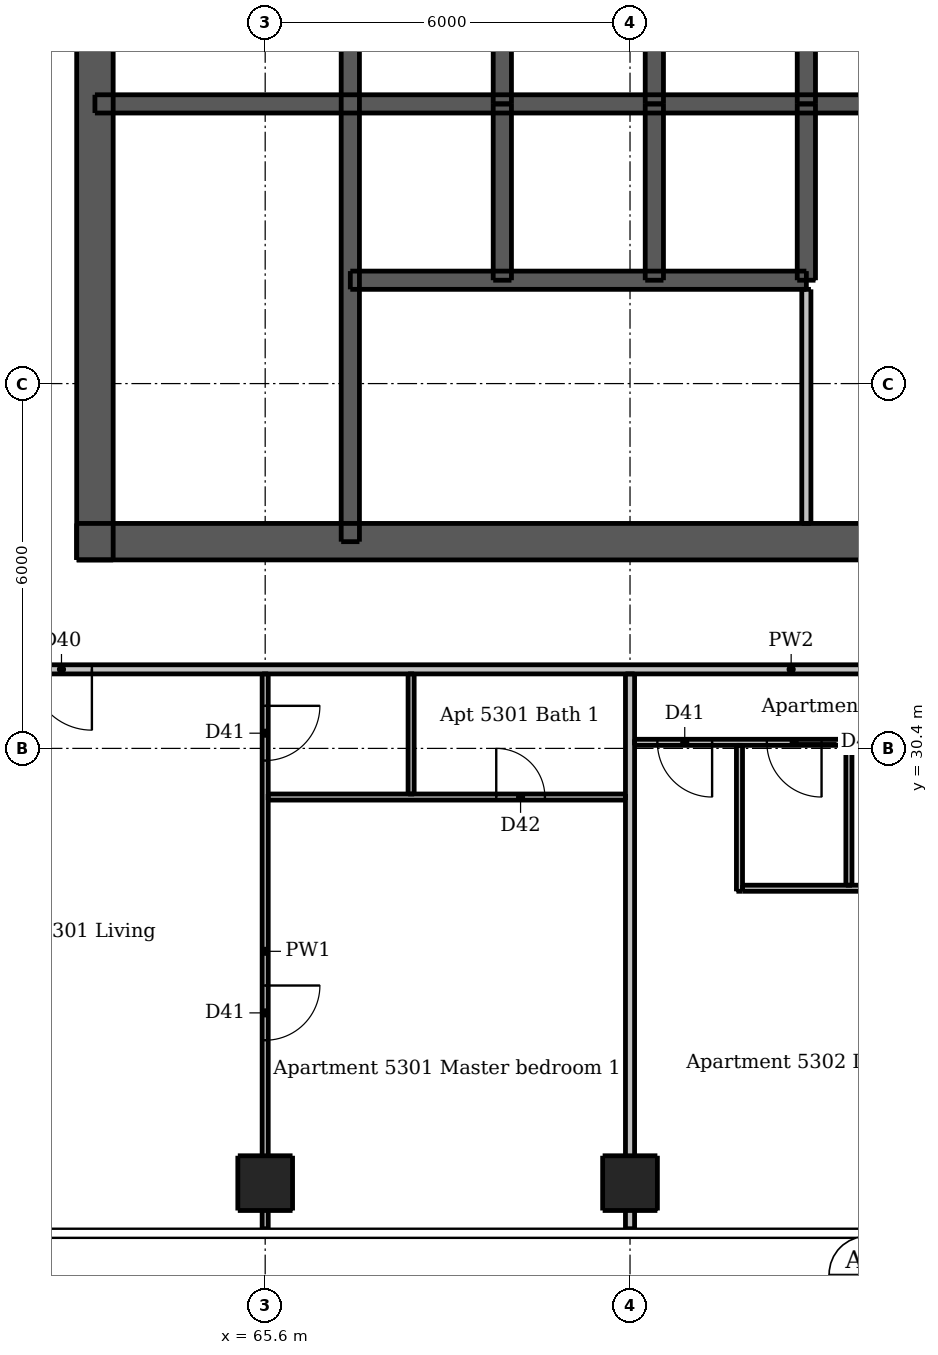
"""IFC4 building model, lengths in metres.
Left out: names, types, materials, properties, quantities, classifications, styles, units other than length and angle.
Written with IfcOpenShell. Run it as: python <this file> out.ifc"""

import sys

from ifc_helpers import new_model, si_unit, direction, frame, frame_2d, origin, origin_2d, place, context, subcontext, project, spatial, rectangle, extrude, element, fill, save


model = new_model("IFC4")
c1 = context("Model", 3, precision=1e-05, world=origin(), true_north=direction((0.0, 1.0)))
c2 = subcontext(c1, "Body", "Model", "MODEL_VIEW")
j1 = project(units=[si_unit("LENGTHUNIT", "METRE"), si_unit("PLANEANGLEUNIT", "RADIAN")], contexts=[c1])
p1 = place(None, origin())
s1 = spatial("IfcSite", under=j1, at=p1, CompositionType="ELEMENT")
p2 = place(p1, origin())
s2 = spatial("IfcBuilding", under=s1, at=p2, CompositionType="ELEMENT")
p3 = place(p2, frame((0.0, 0.0, 200.2)))
s3 = spatial("IfcBuildingStorey", under=s2, at=p3, CompositionType="ELEMENT", Elevation=200.2)
p4 = place(p3, frame((62.5, 33.8, 0.0), z_axis=(0.0, 0.0, 1.0), x_axis=(1.0, 0.0, 0.0)))
e1 = element("IfcWall", 1, at=p4, inside=s3, PredefinedType="SHEAR", context=c2, shape_type="SweptSolid", body=[
    extrude(rectangle(XDim=24.0, YDim=0.6, at=frame_2d((12.0, 0.0))), origin(), (0.0, 0.0, 1.0), 3.05),
])
p5 = place(p4, frame((1.925, 0.0, 0.0)))
e2 = element("IfcOpeningElement", 2, at=p5, cuts=e1, PredefinedType="OPENING", context=c2, shape_type="SweptSolid", body=[
    extrude(rectangle(XDim=1.1, YDim=2.1, at=frame_2d((0.55, 1.05))), frame((0.0, 0.31, 0.0), z_axis=(0.0, -1.0, 0.0), x_axis=(1.0, 0.0, 0.0)), (0.0, 0.0, 1.0), 0.62),
])
p6 = place(p4, frame((20.975, 0.0, 0.0)))
e3 = element("IfcOpeningElement", 3, at=p6, cuts=e1, PredefinedType="OPENING", context=c2, shape_type="SweptSolid", body=[
    extrude(rectangle(XDim=1.1, YDim=2.1, at=frame_2d((0.55, 1.05))), frame((0.0, 0.31, 0.0), z_axis=(0.0, -1.0, 0.0), x_axis=(1.0, 0.0, 0.0)), (0.0, 0.0, 1.0), 0.62),
])
p7 = place(p4, frame((8.0, 0.0, 0.0)))
e4 = element("IfcOpeningElement", 4, at=p7, cuts=e1, PredefinedType="OPENING", context=c2, shape_type="SweptSolid", body=[
    extrude(rectangle(XDim=1.1, YDim=2.1, at=frame_2d((0.55, 1.05))), frame((0.0, 0.31, 0.0), z_axis=(0.0, -1.0, 0.0), x_axis=(1.0, 0.0, 0.0)), (0.0, 0.0, 1.0), 0.62),
])
p8 = place(p4, frame((15.3, 0.0, 0.0)))
e5 = element("IfcOpeningElement", 5, at=p8, cuts=e1, PredefinedType="OPENING", context=c2, shape_type="SweptSolid", body=[
    extrude(rectangle(XDim=0.9, YDim=2.1, at=frame_2d((0.45, 1.05))), frame((0.0, 0.31, 0.0), z_axis=(0.0, -1.0, 0.0), x_axis=(1.0, 0.0, 0.0)), (0.0, 0.0, 1.0), 0.62),
])
p9 = place(p3, frame((62.8, 33.5, 0.0), z_axis=(0.0, 0.0, 1.0), x_axis=(0.0, 1.0, 0.0)))
e6 = element("IfcWall", 6, at=p9, inside=s3, PredefinedType="SHEAR", context=c2, shape_type="SweptSolid", body=[
    extrude(rectangle(XDim=24.0, YDim=0.6, at=frame_2d((12.0, 0.0))), origin(), (0.0, 0.0, 1.0), 3.05),
])
p10 = place(p9, frame((11.2, 0.0, 0.0)))
e7 = element("IfcOpeningElement", 7, at=p10, cuts=e6, PredefinedType="OPENING", context=c2, shape_type="SweptSolid", body=[
    extrude(rectangle(XDim=1.6, YDim=2.1, at=frame_2d((0.8, 1.05))), frame((0.0, 0.31, 0.0), z_axis=(0.0, -1.0, 0.0), x_axis=(1.0, 0.0, 0.0)), (0.0, 0.0, 1.0), 0.62),
])
p11 = place(p3, frame((62.8, 41.0, 0.0), z_axis=(0.0, 0.0, 1.0), x_axis=(1.0, 0.0, 0.0)))
e8 = element("IfcWall", 8, at=p11, inside=s3, PredefinedType="SHEAR", context=c2, shape_type="SweptSolid", body=[
    extrude(rectangle(XDim=23.4, YDim=0.3, at=frame_2d((11.7, 0.0))), origin(), (0.0, 0.0, 1.0), 3.05),
])
p12 = place(p3, frame((67.0, 33.8, 0.0), z_axis=(0.0, 0.0, 1.0), x_axis=(0.0, 1.0, 0.0)))
e9 = element("IfcWall", 9, at=p12, inside=s3, PredefinedType="SHEAR", context=c2, shape_type="SweptSolid", body=[
    extrude(rectangle(XDim=10.1, YDim=0.3, at=frame_2d((5.05, 0.0))), origin(), (0.0, 0.0, 1.0), 3.05),
])
p13 = place(p12, frame((0.5, 0.0, 0.0)))
e10 = element("IfcOpeningElement", 10, at=p13, cuts=e9, PredefinedType="OPENING", context=c2, shape_type="SweptSolid", body=[
    extrude(rectangle(XDim=1.1, YDim=2.1, at=frame_2d((0.55, 1.05))), frame((0.0, 0.16, 0.0), z_axis=(0.0, -1.0, 0.0), x_axis=(1.0, 0.0, 0.0)), (0.0, 0.0, 1.0), 0.32),
])
for number, where, z_axis, x_axis in (
    (11, (69.5, 41.0, 0.0), (0.0, 0.0, 1.0), (0.0, 1.0, 0.0)),
    (12, (72.0, 41.0, 0.0), (0.0, 0.0, 1.0), (0.0, 1.0, 0.0)),
    (13, (74.5, 41.0, 0.0), (0.0, 0.0, 1.0), (0.0, 1.0, 0.0)),
):
    element("IfcWall", number, at=place(p3, frame(where, z_axis=z_axis, x_axis=x_axis)), inside=s3, PredefinedType="SHEAR", context=c2, shape_type="SweptSolid", body=[
        extrude(rectangle(XDim=2.9, YDim=0.3, at=frame_2d((1.45, 0.0))), origin(), (0.0, 0.0, 1.0), 3.05),
    ])
p14 = place(p3, frame((67.0, 38.1, 0.0), z_axis=(0.0, 0.0, 1.0), x_axis=(1.0, 0.0, 0.0)))
e14 = element("IfcWall", 14, at=p14, inside=s3, PredefinedType="SHEAR", context=c2, shape_type="SweptSolid", body=[
    extrude(rectangle(XDim=7.5, YDim=0.3, at=frame_2d((3.75, 0.0))), origin(), (0.0, 0.0, 1.0), 3.05),
])
p15 = place(p14, frame((0.7, 0.0, 0.0)))
e15 = element("IfcOpeningElement", 15, at=p15, cuts=e14, PredefinedType="OPENING", context=c2, shape_type="SweptSolid", body=[
    extrude(rectangle(XDim=1.1, YDim=2.1, at=frame_2d((0.55, 1.05))), frame((0.0, 0.16, 0.0), z_axis=(0.0, -1.0, 0.0), x_axis=(1.0, 0.0, 0.0)), (0.0, 0.0, 1.0), 0.32),
])
p16 = place(p14, frame((3.2, 0.0, 0.0)))
e16 = element("IfcOpeningElement", 16, at=p16, cuts=e14, PredefinedType="OPENING", context=c2, shape_type="SweptSolid", body=[
    extrude(rectangle(XDim=1.1, YDim=2.1, at=frame_2d((0.55, 1.05))), frame((0.0, 0.16, 0.0), z_axis=(0.0, -1.0, 0.0), x_axis=(1.0, 0.0, 0.0)), (0.0, 0.0, 1.0), 0.32),
])
p17 = place(p14, frame((5.65, 0.0, 0.0)))
e17 = element("IfcOpeningElement", 17, at=p17, cuts=e14, PredefinedType="OPENING", context=c2, shape_type="SweptSolid", body=[
    extrude(rectangle(XDim=1.2, YDim=2.1, at=frame_2d((0.6, 1.05))), frame((0.0, 0.16, 0.0), z_axis=(0.0, -1.0, 0.0), x_axis=(1.0, 0.0, 0.0)), (0.0, 0.0, 1.0), 0.32),
])
for number, where, z_axis, x_axis in (
    (18, (69.5, 38.1, 0.0), (0.0, 0.0, 1.0), (0.0, 1.0, 0.0)),
    (19, (72.0, 38.1, 0.0), (0.0, 0.0, 1.0), (0.0, 1.0, 0.0)),
    (20, (74.5, 38.1, 0.0), (0.0, 0.0, 1.0), (0.0, 1.0, 0.0)),
):
    element("IfcWall", number, at=place(p3, frame(where, z_axis=z_axis, x_axis=x_axis)), inside=s3, PredefinedType="SHEAR", context=c2, shape_type="SweptSolid", body=[
        extrude(rectangle(XDim=2.9, YDim=0.3, at=frame_2d((1.45, 0.0))), origin(), (0.0, 0.0, 1.0), 3.05),
    ])
for number, where, z_axis, x_axis in (
    (21, (65.6, 23.25, 0.0), (0.0, 0.0, 1.0), (1.0, 0.0, 0.0)),
    (22, (71.6, 23.25, 0.0), (0.0, 0.0, 1.0), (1.0, 0.0, 0.0)),
):
    element("IfcColumn", number, at=place(p3, frame(where, z_axis=z_axis, x_axis=x_axis)), inside=s3, PredefinedType="COLUMN", context=c2, shape_type="SweptSolid", body=[
        extrude(rectangle(XDim=0.9, YDim=0.9, at=origin_2d()), origin(), (0.0, 0.0, 1.0), 3.05),
    ])
p18 = place(p3, frame((74.5, 34.1, 0.0), z_axis=(0.0, 0.0, 1.0), x_axis=(0.0, 1.0, 0.0)))
e23 = element("IfcWall", 23, at=p18, inside=s3, PredefinedType="PLUMBINGWALL", context=c2, shape_type="SweptSolid", body=[
    extrude(rectangle(XDim=3.85, YDim=0.15, at=frame_2d((1.925, 0.0))), origin(), (0.0, 0.0, 1.0), 3.05),
])
p19 = place(p3, frame((65.6, 31.625, 0.0), z_axis=(0.0, 0.0, 1.0), x_axis=(0.0, -1.0, 0.0)))
e24 = element("IfcWall", 24, at=p19, inside=s3, PredefinedType="PARTITIONING", context=c2, shape_type="SweptSolid", body=[
    extrude(rectangle(XDim=9.125, YDim=0.1, at=frame_2d((4.562, 0.0))), origin(), (0.0, 0.0, 1.0), 2.516),
])
p20 = place(p19, frame((0.525, 0.0, 0.0)))
e25 = element("IfcOpeningElement", 25, at=p20, cuts=e24, PredefinedType="OPENING", context=c2, shape_type="SweptSolid", body=[
    extrude(rectangle(XDim=0.9, YDim=2.1, at=frame_2d((0.45, 1.05))), frame((0.0, 0.06, 0.0), z_axis=(0.0, -1.0, 0.0), x_axis=(1.0, 0.0, 0.0)), (0.0, 0.0, 1.0), 0.12),
])
p21 = place(p19, frame((5.125, 0.0, 0.0)))
e26 = element("IfcOpeningElement", 26, at=p21, cuts=e24, PredefinedType="OPENING", context=c2, shape_type="SweptSolid", body=[
    extrude(rectangle(XDim=0.9, YDim=2.1, at=frame_2d((0.45, 1.05))), frame((0.0, 0.06, 0.0), z_axis=(0.0, -1.0, 0.0), x_axis=(1.0, 0.0, 0.0)), (0.0, 0.0, 1.0), 0.12),
])
p22 = place(p3, frame((68.0, 29.65, 0.0), z_axis=(0.0, 0.0, 1.0), x_axis=(0.0, 1.0, 0.0)))
e27 = element("IfcWall", 27, at=p22, inside=s3, PredefinedType="PARTITIONING", context=c2, shape_type="SweptSolid", body=[
    extrude(rectangle(XDim=1.975, YDim=0.1, at=frame_2d((0.988, 0.0))), origin(), (0.0, 0.0, 1.0), 3.05),
])
p23 = place(p3, frame((73.4, 28.05, 0.0), z_axis=(0.0, 0.0, 1.0), x_axis=(0.0, 1.0, 0.0)))
e28 = element("IfcWall", 28, at=p23, inside=s3, PredefinedType="PARTITIONING", context=c2, shape_type="SweptSolid", body=[
    extrude(rectangle(XDim=2.4, YDim=0.1, at=frame_2d((1.2, 0.0))), origin(), (0.0, 0.0, 1.0), 3.05),
])
p24 = place(p3, frame((75.2, 28.15, 0.0), z_axis=(0.0, 0.0, 1.0), x_axis=(0.0, 1.0, 0.0)))
e29 = element("IfcWall", 29, at=p24, inside=s3, PredefinedType="PARTITIONING", context=c2, shape_type="SweptSolid", body=[
    extrude(rectangle(XDim=2.3, YDim=0.1, at=frame_2d((1.15, 0.0))), origin(), (0.0, 0.0, 1.0), 3.05),
])
p25 = place(p3, frame((88.25, 30.5, 0.0), z_axis=(0.0, 0.0, 1.0), x_axis=(-1.0, 0.0, 0.0)))
e30 = element("IfcWall", 30, at=p25, inside=s3, PredefinedType="PARTITIONING", context=c2, shape_type="SweptSolid", body=[
    extrude(rectangle(XDim=16.575, YDim=0.1, at=frame_2d((8.288, 0.0))), origin(), (0.0, 0.0, 1.0), 3.05),
])
p26 = place(p25, frame((15.3, 0.0, 0.0)))
e31 = element("IfcOpeningElement", 31, at=p26, cuts=e30, PredefinedType="OPENING", context=c2, shape_type="SweptSolid", body=[
    extrude(rectangle(XDim=0.9, YDim=2.1, at=frame_2d((0.45, 1.05))), frame((0.0, 0.06, 0.0), z_axis=(0.0, -1.0, 0.0), x_axis=(1.0, 0.0, 0.0)), (0.0, 0.0, 1.0), 0.12),
])
p27 = place(p25, frame((11.4, 0.0, 0.0)))
e32 = element("IfcOpeningElement", 32, at=p27, cuts=e30, PredefinedType="OPENING", context=c2, shape_type="SweptSolid", body=[
    extrude(rectangle(XDim=0.9, YDim=2.1, at=frame_2d((0.45, 1.05))), frame((0.0, 0.06, 0.0), z_axis=(0.0, -1.0, 0.0), x_axis=(1.0, 0.0, 0.0)), (0.0, 0.0, 1.0), 0.12),
])
p28 = place(p25, frame((13.5, 0.0, 0.0)))
e33 = element("IfcOpeningElement", 33, at=p28, cuts=e30, PredefinedType="OPENING", context=c2, shape_type="SweptSolid", body=[
    extrude(rectangle(XDim=0.9, YDim=2.1, at=frame_2d((0.45, 1.05))), frame((0.0, 0.06, 0.0), z_axis=(0.0, -1.0, 0.0), x_axis=(1.0, 0.0, 0.0)), (0.0, 0.0, 1.0), 0.12),
])
p29 = place(p25, frame((8.7, 0.0, 0.0)))
e34 = element("IfcOpeningElement", 34, at=p29, cuts=e30, PredefinedType="OPENING", context=c2, shape_type="SweptSolid", body=[
    extrude(rectangle(XDim=0.9, YDim=2.1, at=frame_2d((0.45, 1.05))), frame((0.0, 0.06, 0.0), z_axis=(0.0, -1.0, 0.0), x_axis=(1.0, 0.0, 0.0)), (0.0, 0.0, 1.0), 0.12),
])
p30 = place(p25, frame((3.0, 0.0, 0.0)))
e35 = element("IfcOpeningElement", 35, at=p30, cuts=e30, PredefinedType="OPENING", context=c2, shape_type="SweptSolid", body=[
    extrude(rectangle(XDim=0.9, YDim=2.1, at=frame_2d((0.45, 1.05))), frame((0.0, 0.06, 0.0), z_axis=(0.0, -1.0, 0.0), x_axis=(1.0, 0.0, 0.0)), (0.0, 0.0, 1.0), 0.12),
])
p31 = place(p25, frame((0.35, 0.0, 0.0)))
e36 = element("IfcOpeningElement", 36, at=p31, cuts=e30, PredefinedType="OPENING", context=c2, shape_type="SweptSolid", body=[
    extrude(rectangle(XDim=0.9, YDim=2.1, at=frame_2d((0.45, 1.05))), frame((0.0, 0.06, 0.0), z_axis=(0.0, -1.0, 0.0), x_axis=(1.0, 0.0, 0.0)), (0.0, 0.0, 1.0), 0.12),
])
p32 = place(p25, frame((6.05, 0.0, 0.0)))
e37 = element("IfcOpeningElement", 37, at=p32, cuts=e30, PredefinedType="OPENING", context=c2, shape_type="SweptSolid", body=[
    extrude(rectangle(XDim=0.8, YDim=2.1, at=frame_2d((0.4, 1.05))), frame((0.0, 0.06, 0.0), z_axis=(0.0, -1.0, 0.0), x_axis=(1.0, 0.0, 0.0)), (0.0, 0.0, 1.0), 0.12),
])
p33 = place(p3, frame((65.65, 29.6, 0.0), z_axis=(0.0, 0.0, 1.0), x_axis=(1.0, 0.0, 0.0)))
e38 = element("IfcWall", 38, at=p33, inside=s3, PredefinedType="PARTITIONING", context=c2, shape_type="SweptSolid", body=[
    extrude(rectangle(XDim=5.875, YDim=0.1, at=frame_2d((2.938, 0.0))), origin(), (0.0, 0.0, 1.0), 3.05),
])
p34 = place(p33, frame((3.75, 0.0, 0.0)))
e39 = element("IfcOpeningElement", 39, at=p34, cuts=e38, PredefinedType="OPENING", context=c2, shape_type="SweptSolid", body=[
    extrude(rectangle(XDim=0.8, YDim=2.1, at=frame_2d((0.4, 1.05))), frame((0.0, 0.06, 0.0), z_axis=(0.0, -1.0, 0.0), x_axis=(1.0, 0.0, 0.0)), (0.0, 0.0, 1.0), 0.12),
])
p35 = place(p3, frame((73.45, 28.1, 0.0), z_axis=(0.0, 0.0, 1.0), x_axis=(1.0, 0.0, 0.0)))
e40 = element("IfcWall", 40, at=p35, inside=s3, PredefinedType="PARTITIONING", context=c2, shape_type="SweptSolid", body=[
    extrude(rectangle(XDim=4.1, YDim=0.1, at=frame_2d((2.05, 0.0))), origin(), (0.0, 0.0, 1.0), 3.05),
])
p36 = place(p3, frame((71.6, 22.5, 0.0), z_axis=(0.0, 0.0, 1.0), x_axis=(0.0, 1.0, 0.0)))
e41 = element("IfcWall", 41, at=p36, inside=s3, PredefinedType="PARTITIONING", context=c2, shape_type="SweptSolid", body=[
    extrude(rectangle(XDim=9.125, YDim=0.15, at=frame_2d((4.562, 0.0))), origin(), (0.0, 0.0, 1.0), 2.516),
])
p37 = place(p3, frame((89.525, 31.7, 0.0), z_axis=(0.0, 0.0, 1.0), x_axis=(-1.0, 0.0, 0.0)))
e42 = element("IfcWall", 42, at=p37, inside=s3, PredefinedType="PARTITIONING", context=c2, shape_type="SweptSolid", body=[
    extrude(rectangle(XDim=30.55, YDim=0.15, at=frame_2d((15.275, 0.0))), origin(), (0.0, 0.0, 1.0), 3.05),
])
p38 = place(p37, frame((26.775, 0.0, 0.0)))
e43 = element("IfcOpeningElement", 43, at=p38, cuts=e42, PredefinedType="OPENING", context=c2, shape_type="SweptSolid", body=[
    extrude(rectangle(XDim=1.0, YDim=2.1, at=frame_2d((0.5, 1.05))), frame((0.0, 0.085, 0.0), z_axis=(0.0, -1.0, 0.0), x_axis=(1.0, 0.0, 0.0)), (0.0, 0.0, 1.0), 0.17),
])
p39 = place(p37, frame((9.075, 0.0, 0.0)))
e44 = element("IfcOpeningElement", 44, at=p39, cuts=e42, PredefinedType="OPENING", context=c2, shape_type="SweptSolid", body=[
    extrude(rectangle(XDim=1.0, YDim=2.1, at=frame_2d((0.5, 1.05))), frame((0.0, 0.085, 0.0), z_axis=(0.0, -1.0, 0.0), x_axis=(1.0, 0.0, 0.0)), (0.0, 0.0, 1.0), 0.17),
])
p40 = place(p5, origin())
e45 = element("IfcDoor", 45, at=p40, inside=s3, OperationType="SINGLE_SWING_LEFT", PredefinedType="DOOR", context=c2, shape_type="SweptSolid", body=[
    extrude(rectangle(XDim=1.1, YDim=2.1, at=frame_2d((0.55, 1.05))), frame((0.0, 0.288, 0.0), z_axis=(0.0, -1.0, 0.0), x_axis=(1.0, 0.0, 0.0)), (0.0, 0.0, 1.0), 0.05),
])
fill(e2, e45)
p41 = place(p7, origin())
e46 = element("IfcDoor", 46, at=p41, inside=s3, OperationType="SINGLE_SWING_LEFT", PredefinedType="DOOR", context=c2, shape_type="SweptSolid", body=[
    extrude(rectangle(XDim=1.1, YDim=2.1, at=frame_2d((0.55, 1.05))), frame((0.0, 0.288, 0.0), z_axis=(0.0, -1.0, 0.0), x_axis=(1.0, 0.0, 0.0)), (0.0, 0.0, 1.0), 0.05),
])
fill(e4, e46)
p42 = place(p13, origin())
e47 = element("IfcDoor", 47, at=p42, inside=s3, OperationType="SINGLE_SWING_RIGHT", PredefinedType="DOOR", context=c2, shape_type="SweptSolid", body=[
    extrude(rectangle(XDim=1.1, YDim=2.1, at=frame_2d((0.55, 1.05))), frame((0.0, -0.087, 0.0), z_axis=(0.0, -1.0, 0.0), x_axis=(1.0, 0.0, 0.0)), (0.0, 0.0, 1.0), 0.05),
])
fill(e10, e47)
p43 = place(p15, origin())
e48 = element("IfcDoor", 48, at=p43, inside=s3, OperationType="DOUBLE_DOOR_SLIDING", PredefinedType="DOOR", context=c2, shape_type="SweptSolid", body=[
    extrude(rectangle(XDim=1.1, YDim=2.1, at=frame_2d((0.55, 1.05))), frame((0.0, 0.025, 0.0), z_axis=(0.0, -1.0, 0.0), x_axis=(1.0, 0.0, 0.0)), (0.0, 0.0, 1.0), 0.05),
])
fill(e15, e48)
p44 = place(p16, origin())
e49 = element("IfcDoor", 49, at=p44, inside=s3, OperationType="DOUBLE_DOOR_SLIDING", PredefinedType="DOOR", context=c2, shape_type="SweptSolid", body=[
    extrude(rectangle(XDim=1.1, YDim=2.1, at=frame_2d((0.55, 1.05))), frame((0.0, 0.025, 0.0), z_axis=(0.0, -1.0, 0.0), x_axis=(1.0, 0.0, 0.0)), (0.0, 0.0, 1.0), 0.05),
])
fill(e16, e49)
p45 = place(p17, origin())
e50 = element("IfcDoor", 50, at=p45, inside=s3, OperationType="DOUBLE_DOOR_SLIDING", PredefinedType="DOOR", context=c2, shape_type="SweptSolid", body=[
    extrude(rectangle(XDim=1.2, YDim=2.1, at=frame_2d((0.6, 1.05))), frame((0.0, 0.025, 0.0), z_axis=(0.0, -1.0, 0.0), x_axis=(1.0, 0.0, 0.0)), (0.0, 0.0, 1.0), 0.05),
])
fill(e17, e50)
p46 = place(p38, origin())
e51 = element("IfcDoor", 51, at=p46, inside=s3, OperationType="SINGLE_SWING_LEFT", PredefinedType="DOOR", context=c2, shape_type="SweptSolid", body=[
    extrude(rectangle(XDim=1.0, YDim=2.1, at=frame_2d((0.5, 1.05))), frame((0.0, 0.025, 0.0), z_axis=(0.0, -1.0, 0.0), x_axis=(1.0, 0.0, 0.0)), (0.0, 0.0, 1.0), 0.05),
])
fill(e43, e51)
p47 = place(p20, origin())
e52 = element("IfcDoor", 52, at=p47, inside=s3, OperationType="SINGLE_SWING_LEFT", PredefinedType="DOOR", context=c2, shape_type="SweptSolid", body=[
    extrude(rectangle(XDim=0.9, YDim=2.1, at=frame_2d((0.45, 1.05))), frame((0.0, 0.025, 0.0), z_axis=(0.0, -1.0, 0.0), x_axis=(1.0, 0.0, 0.0)), (0.0, 0.0, 1.0), 0.05),
])
fill(e25, e52)
p48 = place(p21, origin())
e53 = element("IfcDoor", 53, at=p48, inside=s3, OperationType="SINGLE_SWING_LEFT", PredefinedType="DOOR", context=c2, shape_type="SweptSolid", body=[
    extrude(rectangle(XDim=0.9, YDim=2.1, at=frame_2d((0.45, 1.05))), frame((0.0, 0.025, 0.0), z_axis=(0.0, -1.0, 0.0), x_axis=(1.0, 0.0, 0.0)), (0.0, 0.0, 1.0), 0.05),
])
fill(e26, e53)
p49 = place(p34, origin())
e54 = element("IfcDoor", 54, at=p49, inside=s3, OperationType="SINGLE_SWING_LEFT", PredefinedType="DOOR", context=c2, shape_type="SweptSolid", body=[
    extrude(rectangle(XDim=0.8, YDim=2.1, at=frame_2d((0.4, 1.05))), frame((0.0, 0.025, 0.0), z_axis=(0.0, -1.0, 0.0), x_axis=(1.0, 0.0, 0.0)), (0.0, 0.0, 1.0), 0.05),
])
fill(e39, e54)
p50 = place(p26, origin())
e55 = element("IfcDoor", 55, at=p50, inside=s3, OperationType="SINGLE_SWING_LEFT", PredefinedType="DOOR", context=c2, shape_type="SweptSolid", body=[
    extrude(rectangle(XDim=0.9, YDim=2.1, at=frame_2d((0.45, 1.05))), frame((0.0, 0.025, 0.0), z_axis=(0.0, -1.0, 0.0), x_axis=(1.0, 0.0, 0.0)), (0.0, 0.0, 1.0), 0.05),
])
fill(e31, e55)
p51 = place(p28, origin())
e56 = element("IfcDoor", 56, at=p51, inside=s3, OperationType="SINGLE_SWING_LEFT", PredefinedType="DOOR", context=c2, shape_type="SweptSolid", body=[
    extrude(rectangle(XDim=0.9, YDim=2.1, at=frame_2d((0.45, 1.05))), frame((0.0, 0.025, 0.0), z_axis=(0.0, -1.0, 0.0), x_axis=(1.0, 0.0, 0.0)), (0.0, 0.0, 1.0), 0.05),
])
fill(e33, e56)
save(model, sys.argv[1])
